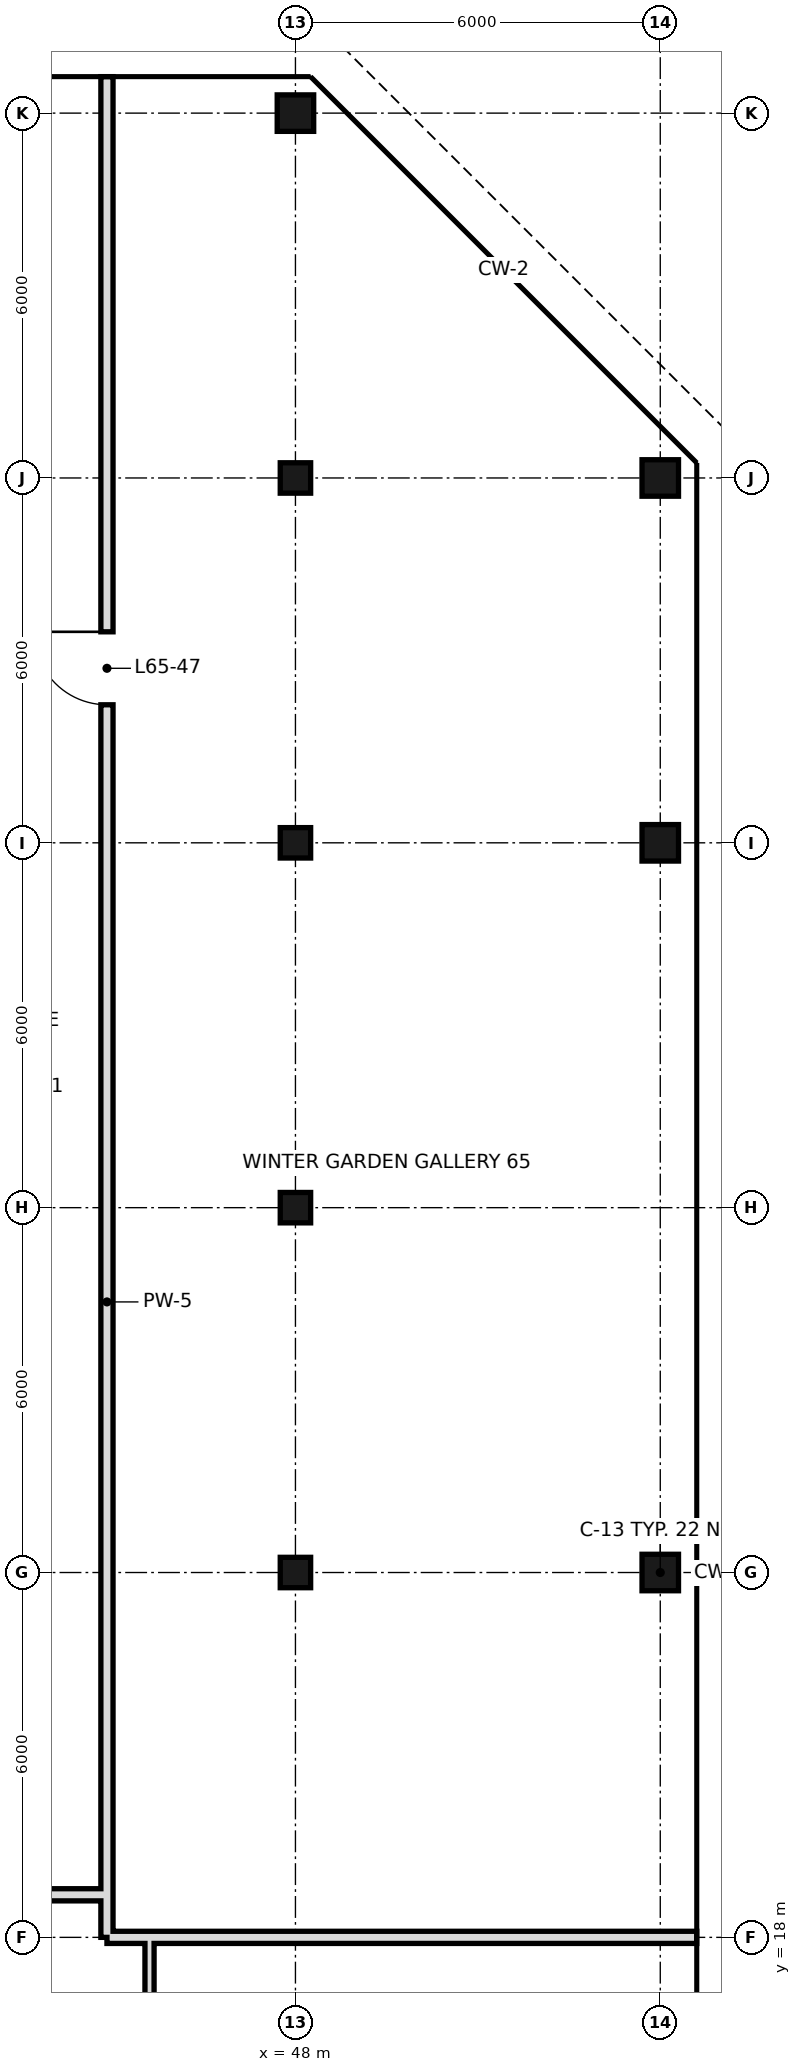
"""IFC4 building model, lengths in metres.
Left out: names, types, materials, properties, quantities, classifications, styles, units other than length and angle.
Written with IfcOpenShell. Run it as: python <this file> out.ifc"""

import sys

from ifc_helpers import new_model, si_unit, direction, frame, frame_2d, origin, origin_2d, place, context, subcontext, project, spatial, rectangle, hollow_rectangle, extrude, element, fill, save


model = new_model("IFC4")
c1 = context("Model", 3, precision=1e-05, world=origin(), true_north=direction((0.0, 1.0)))
c2 = subcontext(c1, "Body", "Model", "MODEL_VIEW")
j1 = project(units=[si_unit("LENGTHUNIT", "METRE"), si_unit("PLANEANGLEUNIT", "RADIAN")], contexts=[c1])
p1 = place(None, origin())
s1 = spatial("IfcSite", under=j1, at=p1, CompositionType="ELEMENT")
p2 = place(p1, origin())
s2 = spatial("IfcBuilding", under=s1, at=p2, CompositionType="ELEMENT")
p3 = place(p2, frame((0.0, 0.0, 273.8)))
s3 = spatial("IfcBuildingStorey", under=s2, at=p3, CompositionType="ELEMENT", Elevation=273.8)
for number, where, z_axis, x_axis in (
    (1, (48.0, 24.0, 0.0), (0.0, 0.0, 1.0), (1.0, 0.0, 0.0)),
    (2, (48.0, 30.0, 0.0), (0.0, 0.0, 1.0), (1.0, 0.0, 0.0)),
    (3, (48.0, 36.0, 0.0), (0.0, 0.0, 1.0), (1.0, 0.0, 0.0)),
    (4, (48.0, 42.0, 0.0), (0.0, 0.0, 1.0), (1.0, 0.0, 0.0)),
):
    element("IfcColumn", number, at=place(p3, frame(where, z_axis=z_axis, x_axis=x_axis)), inside=s3, PredefinedType="COLUMN", context=c2, shape_type="SweptSolid", body=[
        extrude(hollow_rectangle(XDim=0.5, YDim=0.5, WallThickness=0.025, at=origin_2d()), origin(), (0.0, 0.0, 1.0), 3.6),
    ])
for number, where, z_axis, x_axis in (
    (5, (48.0, 48.0, 0.0), (0.0, 0.0, 1.0), (1.0, 0.0, 0.0)),
    (6, (54.0, 24.0, 0.0), (0.0, 0.0, 1.0), (1.0, 0.0, 0.0)),
    (7, (54.0, 36.0, 0.0), (0.0, 0.0, 1.0), (1.0, 0.0, 0.0)),
    (8, (54.0, 42.0, 0.0), (0.0, 0.0, 1.0), (1.0, 0.0, 0.0)),
):
    element("IfcColumn", number, at=place(p3, frame(where, z_axis=z_axis, x_axis=x_axis)), inside=s3, PredefinedType="COLUMN", context=c2, shape_type="SweptSolid", body=[
        extrude(hollow_rectangle(XDim=0.6, YDim=0.6, WallThickness=0.028, at=origin_2d()), origin(), (0.0, 0.0, 1.0), 3.6),
    ])
p4 = place(p3, frame((44.9, 18.0, 0.0), z_axis=(0.0, 0.0, 1.0), x_axis=(0.0, 1.0, 0.0)))
e9 = element("IfcWall", 9, at=p4, inside=s3, PredefinedType="SOLIDWALL", context=c2, shape_type="SweptSolid", body=[
    extrude(rectangle(XDim=30.6, YDim=0.2, at=frame_2d((15.3, 0.0))), origin(), (0.0, 0.0, 1.0), 2.72),
])
p5 = place(p4, frame((20.27, 0.0, 0.0)))
e10 = element("IfcOpeningElement", 10, at=p5, cuts=e9, PredefinedType="OPENING", context=c2, shape_type="SweptSolid", body=[
    extrude(rectangle(XDim=1.2, YDim=2.4, at=frame_2d((0.6, 1.2))), frame((0.0, 0.11, 0.0), z_axis=(0.0, -1.0, 0.0), x_axis=(1.0, 0.0, 0.0)), (0.0, 0.0, 1.0), 0.22),
])
p6 = place(p3, frame((45.6, 10.8, 0.0), z_axis=(0.0, 0.0, 1.0), x_axis=(0.0, 1.0, 0.0)))
e11 = element("IfcWall", 11, at=p6, inside=s3, PredefinedType="PARTITIONING", context=c2, shape_type="SweptSolid", body=[
    extrude(rectangle(XDim=7.2, YDim=0.15, at=frame_2d((3.6, 0.0))), origin(), (0.0, 0.0, 1.0), 3.42),
])
p7 = place(p3, frame((44.9, 18.0, 0.0), z_axis=(0.0, 0.0, 1.0), x_axis=(1.0, 0.0, 0.0)))
e12 = element("IfcWall", 12, at=p7, inside=s3, PredefinedType="SOLIDWALL", context=c2, shape_type="SweptSolid", body=[
    extrude(rectangle(XDim=9.7, YDim=0.2, at=frame_2d((4.85, 0.0))), origin(), (0.0, 0.0, 1.0), 2.72),
])
p8 = place(p3, frame((27.6, 18.7, 0.0), z_axis=(0.0, 0.0, 1.0), x_axis=(1.0, 0.0, 0.0)))
e13 = element("IfcWall", 13, at=p8, inside=s3, PredefinedType="SOLIDWALL", context=c2, shape_type="SweptSolid", body=[
    extrude(rectangle(XDim=17.3, YDim=0.2, at=frame_2d((8.65, 0.0))), origin(), (0.0, 0.0, 1.0), 2.72),
])
p9 = place(p8, frame((1.54, 0.0, 0.0)))
e14 = element("IfcOpeningElement", 14, at=p9, cuts=e13, PredefinedType="OPENING", context=c2, shape_type="SweptSolid", body=[
    extrude(rectangle(XDim=1.2, YDim=2.4, at=frame_2d((0.6, 1.2))), frame((0.0, 0.11, 0.0), z_axis=(0.0, -1.0, 0.0), x_axis=(1.0, 0.0, 0.0)), (0.0, 0.0, 1.0), 0.22),
])
p10 = place(p5, frame((1.2, 0.0, 0.0), z_axis=(0.0, 0.0, 1.0), x_axis=(-1.0, 0.0, 0.0)))
e15 = element("IfcDoor", 15, at=p10, inside=s3, OperationType="SINGLE_SWING_LEFT", PredefinedType="DOOR", context=c2, shape_type="SweptSolid", body=[
    extrude(rectangle(XDim=1.2, YDim=2.4, at=frame_2d((0.6, 1.2))), frame((0.0, 0.025, 0.0), z_axis=(0.0, -1.0, 0.0), x_axis=(1.0, 0.0, 0.0)), (0.0, 0.0, 1.0), 0.05),
])
fill(e10, e15)
save(model, sys.argv[1])
